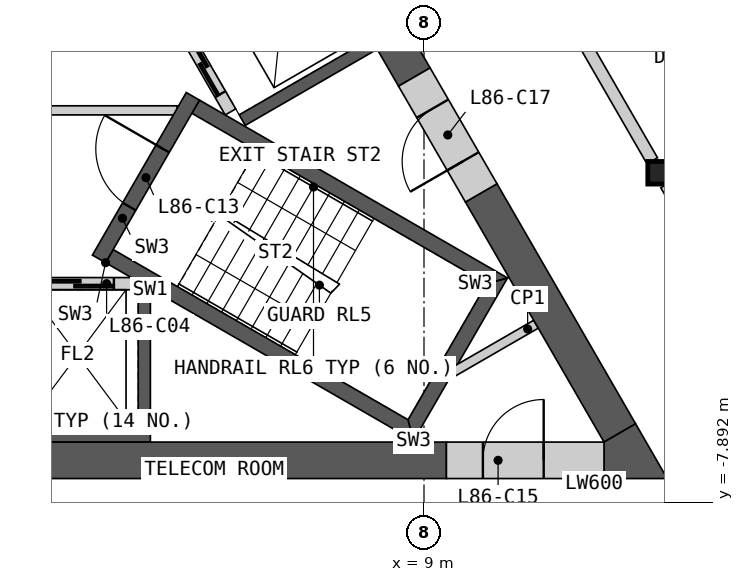
"""IFC4 building model, lengths in metres.
Left out: names, types, materials, properties, quantities, classifications, styles, units other than length and angle.
Written with IfcOpenShell. Run it as: python <this file> out.ifc"""

import sys

from ifc_helpers import new_model, si_unit, direction, frame, frame_2d, origin, origin_2d, place, context, subcontext, project, spatial, polyline, rectangle, i_section, outline, extrude, element, fill, save


model = new_model("IFC4")
c1 = context("Model", 3, precision=1e-05, world=origin(), true_north=direction((0.0, 1.0)))
c2 = subcontext(c1, "Body", "Model", "MODEL_VIEW")
j1 = project(units=[si_unit("LENGTHUNIT", "METRE"), si_unit("PLANEANGLEUNIT", "RADIAN")], contexts=[c1])
p1 = place(None, origin())
s1 = spatial("IfcSite", under=j1, at=p1, CompositionType="ELEMENT")
p2 = place(p1, origin())
s2 = spatial("IfcBuilding", under=s1, at=p2, CompositionType="ELEMENT")
p3 = place(p2, frame((0.0, 0.0, 381.4)))
s3 = spatial("IfcBuildingStorey", under=s2, at=p3, CompositionType="ELEMENT", Elevation=381.4)
p4 = place(p3, frame((12.868, -2.476, 0.0), z_axis=(0.0, 0.0, 1.0), x_axis=(1.0, 0.0, 0.0)))
e1 = element("IfcColumn", 1, at=p4, inside=s3, PredefinedType="COLUMN", context=c2, shape_type="SweptSolid", body=[
    extrude(i_section(OverallWidth=0.374, OverallDepth=0.372, WebThickness=0.016, FlangeThickness=0.026, at=origin_2d()), origin(), (0.0, 0.0, 1.0), 3.4),
])
p5 = place(p3, origin())
e2 = element("IfcWall", 2, at=p5, inside=s3, PredefinedType="SHEAR", context=c2, shape_type="SweptSolid", body=[
    extrude(outline(polyline([(4.5, -4.4), (4.5, -6.906), (-4.5, -6.906), (-4.5, -4.4), (-4.3, -4.4), (-4.3, -6.7), (-2.3, -6.7), (-2.3, -4.4), (-2.1, -4.4), (-2.1, -6.7), (-0.1, -6.7), (-0.1, -4.4), (0.1, -4.4), (0.1, -6.7), (2.1, -6.7), (2.1, -4.4), (2.3, -4.4), (2.3, -6.7), (4.3, -6.7), (4.3, -4.4), (4.5, -4.4)])), origin(), (0.0, 0.0, 1.0), 3.1),
])
p6 = place(p3, frame((-4.187, -4.3, 0.0), z_axis=(0.0, 0.0, 1.0), x_axis=(1.0, 0.0, 0.0)))
e3 = element("IfcWall", 3, at=p6, inside=s3, PredefinedType="SOLIDWALL", context=c2, shape_type="SweptSolid", body=[
    extrude(rectangle(XDim=8.373, YDim=0.2, at=frame_2d((4.187, 0.0))), origin(), (0.0, 0.0, 1.0), 3.1),
])
p7 = place(p6, frame((0.287, 0.0, 0.0)))
e4 = element("IfcOpeningElement", 4, at=p7, cuts=e3, PredefinedType="OPENING", context=c2, shape_type="SweptSolid", body=[
    extrude(rectangle(XDim=1.2, YDim=2.1, at=frame_2d((0.6, 1.05))), frame((0.0, 0.11, 0.0), z_axis=(0.0, -1.0, 0.0), x_axis=(1.0, 0.0, 0.0)), (0.0, 0.0, 1.0), 0.22),
])
p8 = place(p6, frame((2.387, 0.0, 0.0)))
e5 = element("IfcOpeningElement", 5, at=p8, cuts=e3, PredefinedType="OPENING", context=c2, shape_type="SweptSolid", body=[
    extrude(rectangle(XDim=1.4, YDim=2.1, at=frame_2d((0.7, 1.05))), frame((0.0, 0.11, 0.0), z_axis=(0.0, -1.0, 0.0), x_axis=(1.0, 0.0, 0.0)), (0.0, 0.0, 1.0), 0.22),
])
p9 = place(p6, frame((4.737, 0.0, 0.0)))
e6 = element("IfcOpeningElement", 6, at=p9, cuts=e3, PredefinedType="OPENING", context=c2, shape_type="SweptSolid", body=[
    extrude(rectangle(XDim=1.1, YDim=2.1, at=frame_2d((0.55, 1.05))), frame((0.0, 0.11, 0.0), z_axis=(0.0, -1.0, 0.0), x_axis=(1.0, 0.0, 0.0)), (0.0, 0.0, 1.0), 0.22),
])
p10 = place(p6, frame((6.887, 0.0, 0.0)))
e7 = element("IfcOpeningElement", 7, at=p10, cuts=e3, PredefinedType="OPENING", context=c2, shape_type="SweptSolid", body=[
    extrude(rectangle(XDim=1.2, YDim=2.1, at=frame_2d((0.6, 1.05))), frame((0.0, 0.11, 0.0), z_axis=(0.0, -1.0, 0.0), x_axis=(1.0, 0.0, 0.0)), (0.0, 0.0, 1.0), 0.22),
])
p11 = place(p3, origin())
e8 = element("IfcWall", 8, at=p11, inside=s3, PredefinedType="SHEAR", context=c2, shape_type="SweptSolid", body=[
    extrude(outline(polyline([(1.561, 6.097), (3.731, 7.35), (8.231, -0.444), (6.061, -1.697), (5.96, -1.524), (7.952, -0.374), (6.952, 1.358), (4.96, 0.208), (4.861, 0.381), (6.852, 1.531), (5.852, 3.263), (3.861, 2.113), (3.76, 2.287), (5.752, 3.437), (4.752, 5.169), (2.76, 4.019), (2.66, 4.192), (4.652, 5.342), (3.652, 7.074), (1.66, 5.924), (1.561, 6.097)])), origin(), (0.0, 0.0, 1.0), 3.1),
])
p12 = place(p3, frame((5.817, -1.476, 0.0), z_axis=(0.0, 0.0, 1.0), x_axis=(-0.500002616675, 0.866023893041, 0.0)))
e9 = element("IfcWall", 9, at=p12, inside=s3, PredefinedType="SOLIDWALL", context=c2, shape_type="SweptSolid", body=[
    extrude(rectangle(XDim=8.373, YDim=0.2, at=frame_2d((4.187, 0.0))), origin(), (0.0, 0.0, 1.0), 3.1),
])
p13 = place(p12, frame((0.337, 0.0, 0.0)))
e10 = element("IfcOpeningElement", 10, at=p13, cuts=e9, PredefinedType="OPENING", context=c2, shape_type="SweptSolid", body=[
    extrude(rectangle(XDim=1.1, YDim=2.1, at=frame_2d((0.55, 1.05))), frame((0.0, 0.11, 0.0), z_axis=(0.0, -1.0, 0.0), x_axis=(1.0, 0.0, 0.0)), (0.0, 0.0, 1.0), 0.22),
])
p14 = place(p12, frame((2.537, 0.0, 0.0)))
e11 = element("IfcOpeningElement", 11, at=p14, cuts=e9, PredefinedType="OPENING", context=c2, shape_type="SweptSolid", body=[
    extrude(rectangle(XDim=1.1, YDim=2.1, at=frame_2d((0.55, 1.05))), frame((0.0, 0.11, 0.0), z_axis=(0.0, -1.0, 0.0), x_axis=(1.0, 0.0, 0.0)), (0.0, 0.0, 1.0), 0.22),
])
p15 = place(p12, frame((4.737, 0.0, 0.0)))
e12 = element("IfcOpeningElement", 12, at=p15, cuts=e9, PredefinedType="OPENING", context=c2, shape_type="SweptSolid", body=[
    extrude(rectangle(XDim=1.1, YDim=2.1, at=frame_2d((0.55, 1.05))), frame((0.0, 0.11, 0.0), z_axis=(0.0, -1.0, 0.0), x_axis=(1.0, 0.0, 0.0)), (0.0, 0.0, 1.0), 0.22),
])
p16 = place(p12, frame((7.037, 0.0, 0.0)))
e13 = element("IfcOpeningElement", 13, at=p16, cuts=e9, PredefinedType="OPENING", context=c2, shape_type="SweptSolid", body=[
    extrude(rectangle(XDim=0.9, YDim=2.1, at=frame_2d((0.45, 1.05))), frame((0.0, 0.11, 0.0), z_axis=(0.0, -1.0, 0.0), x_axis=(1.0, 0.0, 0.0)), (0.0, 0.0, 1.0), 0.22),
])
p17 = place(p3, frame((-4.941, -1.45, 0.0), z_axis=(0.0, 0.0, 1.0), x_axis=(1.0, 0.0, 0.0)))
e14 = element("IfcWall", 14, at=p17, inside=s3, PredefinedType="PARTITIONING", context=c2, shape_type="SweptSolid", body=[
    extrude(rectangle(XDim=9.882, YDim=0.15, at=frame_2d((4.941, 0.0))), origin(), (0.0, 0.0, 1.0), 3.1),
])
p18 = place(p17, frame((4.391, 0.0, 0.0)))
e15 = element("IfcOpeningElement", 15, at=p18, cuts=e14, PredefinedType="OPENING", context=c2, shape_type="SweptSolid", body=[
    extrude(rectangle(XDim=1.1, YDim=2.1, at=frame_2d((0.55, 1.05))), frame((0.0, 0.085, 0.0), z_axis=(0.0, -1.0, 0.0), x_axis=(1.0, 0.0, 0.0)), (0.0, 0.0, 1.0), 0.17),
])
p19 = place(p3, origin())
e16 = element("IfcWall", 16, at=p19, inside=s3, PredefinedType="SHEAR", context=c2, shape_type="SweptSolid", body=[
    extrude(outline(polyline([(3.763, -3.956), (8.83, -6.881), (8.738, -6.539), (3.888, -3.739), (3.763, -3.956)])), origin(), (0.0, 0.0, 1.0), 3.1),
])
p20 = place(p3, origin())
e17 = element("IfcWall", 17, at=p20, inside=s3, PredefinedType="SHEAR", context=c2, shape_type="SweptSolid", body=[
    extrude(outline(polyline([(8.83, -6.881), (10.374, -4.206), (10.032, -4.298), (8.738, -6.539), (8.83, -6.881)])), origin(), (0.0, 0.0, 1.0), 3.1),
])
p21 = place(p3, origin())
e18 = element("IfcWall", 18, at=p21, inside=s3, PredefinedType="SHEAR", context=c2, shape_type="SweptSolid", body=[
    extrude(outline(polyline([(10.032, -4.298), (10.374, -4.206), (5.307, -1.281), (5.182, -1.498), (10.032, -4.298)])), origin(), (0.0, 0.0, 1.0), 3.1),
])
p22 = place(p3, frame((3.655, -3.893, 0.0), z_axis=(0.0, 0.0, 1.0), x_axis=(0.499982516597, 0.866035497597, 0.0)))
e19 = element("IfcWall", 19, at=p22, inside=s3, PredefinedType="SHEAR", context=c2, shape_type="SweptSolid", body=[
    extrude(rectangle(XDim=3.088, YDim=0.25, at=frame_2d((1.544, 0.0))), origin(), (0.0, 0.0, 1.0), 3.1),
])
p23 = place(p22, frame((0.994, 0.0, 0.0)))
e20 = element("IfcOpeningElement", 20, at=p23, cuts=e19, PredefinedType="OPENING", context=c2, shape_type="SweptSolid", body=[
    extrude(rectangle(XDim=1.1, YDim=2.1, at=frame_2d((0.55, 1.05))), frame((0.0, 0.135, 0.0), z_axis=(0.0, -1.0, 0.0), x_axis=(1.0, 0.0, 0.0)), (0.0, 0.0, 1.0), 0.27),
])
p24 = place(p3, frame((10.842, -4.967, 0.0), z_axis=(0.0, 0.0, 1.0), x_axis=(-0.866098216386, -0.499873863663, 0.0)))
e21 = element("IfcWall", 21, at=p24, inside=s3, PredefinedType="PARTITIONING", context=c2, shape_type="SweptSolid", body=[
    extrude(rectangle(XDim=1.582, YDim=0.15, at=frame_2d((0.791, 0.0))), origin(), (0.0, 0.0, 1.0), 3.1),
])
p25 = place(p3, frame((-4.892, -7.206, 0.0), z_axis=(0.0, 0.0, 1.0), x_axis=(1.0, 0.0, 0.0)))
e22 = element("IfcWall", 22, at=p25, inside=s3, PredefinedType="SHEAR", context=c2, shape_type="SweptSolid", body=[
    extrude(rectangle(XDim=14.261, YDim=0.6, at=frame_2d((7.13, 0.0))), origin(), (0.0, 0.0, 1.0), 3.1),
])
p26 = place(p3, frame((8.841, -0.902, 0.0), z_axis=(0.0, 0.0, 1.0), x_axis=(-0.499995618375, 0.866027933502, 0.0)))
e23 = element("IfcWall", 23, at=p26, inside=s3, PredefinedType="SHEAR", context=c2, shape_type="SweptSolid", body=[
    extrude(rectangle(XDim=14.571, YDim=0.6, at=frame_2d((7.285, 0.0))), origin(), (0.0, 0.0, 1.0), 3.1),
])
p27 = place(p3, frame((12.221, -6.756, 0.0), z_axis=(0.0, 0.0, 1.0), x_axis=(-0.500020646047, 0.866013483456, 0.0)))
e24 = element("IfcWall", 24, at=p27, inside=s3, PredefinedType="SHEAR", context=c2, shape_type="SweptSolid", body=[
    extrude(rectangle(XDim=4.559, YDim=0.6, at=frame_2d((2.28, 0.0))), origin(), (0.0, 0.0, 1.0), 3.1),
])
p28 = place(p3, origin())
e25 = element("IfcWall", 25, at=p28, inside=s3, PredefinedType="SHEAR", context=c2, shape_type="SweptSolid", body=[
    extrude(outline(polyline([(11.961, -7.506), (11.961, -6.906), (12.48, -6.606), (13.0, -7.506), (11.961, -7.506)])), origin(), (0.0, 0.0, 1.0), 3.1),
])
p29 = place(p3, frame((9.369, -7.206, 0.0), z_axis=(0.0, 0.0, 1.0), x_axis=(1.0, 0.0, 0.0)))
e26 = element("IfcWall", 26, at=p29, inside=s3, PredefinedType="SHEAR", context=c2, shape_type="SweptSolid", body=[
    extrude(rectangle(XDim=2.592, YDim=0.6, at=frame_2d((1.296, 0.0))), origin(), (0.0, 0.0, 1.0), 3.1),
])
p30 = place(p29, frame((0.6, 0.0, 0.0)))
e27 = element("IfcOpeningElement", 27, at=p30, cuts=e26, PredefinedType="OPENING", context=c2, shape_type="SweptSolid", body=[
    extrude(rectangle(XDim=1.0, YDim=2.1, at=frame_2d((0.5, 1.05))), frame((0.0, 0.31, 0.0), z_axis=(0.0, -1.0, 0.0), x_axis=(1.0, 0.0, 0.0)), (0.0, 0.0, 1.0), 0.62),
])
p31 = place(p3, frame((9.941, -2.807, 0.0), z_axis=(0.0, 0.0, 1.0), x_axis=(-0.499994660107, 0.866028486751, 0.0)))
e28 = element("IfcWall", 28, at=p31, inside=s3, PredefinedType="SHEAR", context=c2, shape_type="SweptSolid", body=[
    extrude(rectangle(XDim=2.2, YDim=0.6, at=frame_2d((1.1, 0.0))), origin(), (0.0, 0.0, 1.0), 3.1),
])
p32 = place(p31, frame((0.6, 0.0, 0.0)))
e29 = element("IfcOpeningElement", 29, at=p32, cuts=e28, PredefinedType="OPENING", context=c2, shape_type="SweptSolid", body=[
    extrude(rectangle(XDim=1.0, YDim=2.1, at=frame_2d((0.5, 1.05))), frame((0.0, 0.31, 0.0), z_axis=(0.0, -1.0, 0.0), x_axis=(1.0, 0.0, 0.0)), (0.0, 0.0, 1.0), 0.62),
])
p33 = place(p3, frame((8.692, 4.756, 0.0), z_axis=(0.0, 0.0, 1.0), x_axis=(0.500001682468, -0.866024432409, 0.0)))
e30 = element("IfcWall", 30, at=p33, inside=s3, PredefinedType="PARTITIONING", context=c2, shape_type="SweptSolid", body=[
    extrude(rectangle(XDim=8.124, YDim=0.2, at=frame_2d((4.062, 0.0))), origin(), (0.0, 0.0, 1.0), 3.1),
])
p34 = place(p33, frame((1.956, 0.0, 0.0)))
e31 = element("IfcOpeningElement", 31, at=p34, cuts=e30, PredefinedType="OPENING", context=c2, shape_type="SweptSolid", body=[
    extrude(rectangle(XDim=1.0, YDim=2.1, at=frame_2d((0.5, 1.05))), frame((0.0, 0.11, 0.0), z_axis=(0.0, -1.0, 0.0), x_axis=(1.0, 0.0, 0.0)), (0.0, 0.0, 1.0), 0.22),
])
p35 = place(p3, frame((12.981, -2.673, 0.0), z_axis=(0.0, 0.0, 1.0), x_axis=(0.499986217557, -0.866033360935, 0.0)))
e32 = element("IfcWall", 32, at=p35, inside=s3, PredefinedType="PARTITIONING", context=c2, shape_type="SweptSolid", body=[
    extrude(rectangle(XDim=4.3, YDim=0.2, at=frame_2d((2.15, 0.0))), origin(), (0.0, 0.0, 1.0), 3.1),
])
p36 = place(p10, origin())
e33 = element("IfcDoor", 33, at=p36, inside=s3, OperationType="SLIDING_TO_LEFT", PredefinedType="DOOR", context=c2, shape_type="SweptSolid", body=[
    extrude(rectangle(XDim=1.2, YDim=2.1, at=frame_2d((0.6, 1.05))), frame((0.0, 0.025, 0.0), z_axis=(0.0, -1.0, 0.0), x_axis=(1.0, 0.0, 0.0)), (0.0, 0.0, 1.0), 0.05),
])
fill(e7, e33)
p37 = place(p13, origin())
e34 = element("IfcDoor", 34, at=p37, inside=s3, OperationType="SLIDING_TO_LEFT", PredefinedType="DOOR", context=c2, shape_type="SweptSolid", body=[
    extrude(rectangle(XDim=1.1, YDim=2.1, at=frame_2d((0.55, 1.05))), frame((0.0, 0.025, 0.0), z_axis=(0.0, -1.0, 0.0), x_axis=(1.0, 0.0, 0.0)), (0.0, 0.0, 1.0), 0.05),
])
fill(e10, e34)
p38 = place(p23, origin())
e35 = element("IfcDoor", 35, at=p38, inside=s3, OperationType="SINGLE_SWING_RIGHT", PredefinedType="DOOR", context=c2, shape_type="SweptSolid", body=[
    extrude(rectangle(XDim=1.1, YDim=2.1, at=frame_2d((0.55, 1.05))), frame((0.0, 0.025, 0.0), z_axis=(0.0, -1.0, 0.0), x_axis=(1.0, 0.0, 0.0)), (0.0, 0.0, 1.0), 0.05),
])
fill(e20, e35)
p39 = place(p30, origin())
e36 = element("IfcDoor", 36, at=p39, inside=s3, OperationType="SINGLE_SWING_RIGHT", PredefinedType="DOOR", context=c2, shape_type="SweptSolid", body=[
    extrude(rectangle(XDim=1.0, YDim=2.1, at=frame_2d((0.5, 1.05))), frame((0.0, 0.055, 0.0), z_axis=(0.0, -1.0, 0.0), x_axis=(1.0, 0.0, 0.0)), (0.0, 0.0, 1.0), 0.05),
])
fill(e27, e36)
p40 = place(p32, origin())
e37 = element("IfcDoor", 37, at=p40, inside=s3, OperationType="SINGLE_SWING_LEFT", PredefinedType="DOOR", context=c2, shape_type="SweptSolid", body=[
    extrude(rectangle(XDim=1.0, YDim=2.1, at=frame_2d((0.5, 1.05))), frame((0.0, 0.055, 0.0), z_axis=(0.0, -1.0, 0.0), x_axis=(1.0, 0.0, 0.0)), (0.0, 0.0, 1.0), 0.05),
])
fill(e29, e37)
save(model, sys.argv[1])
